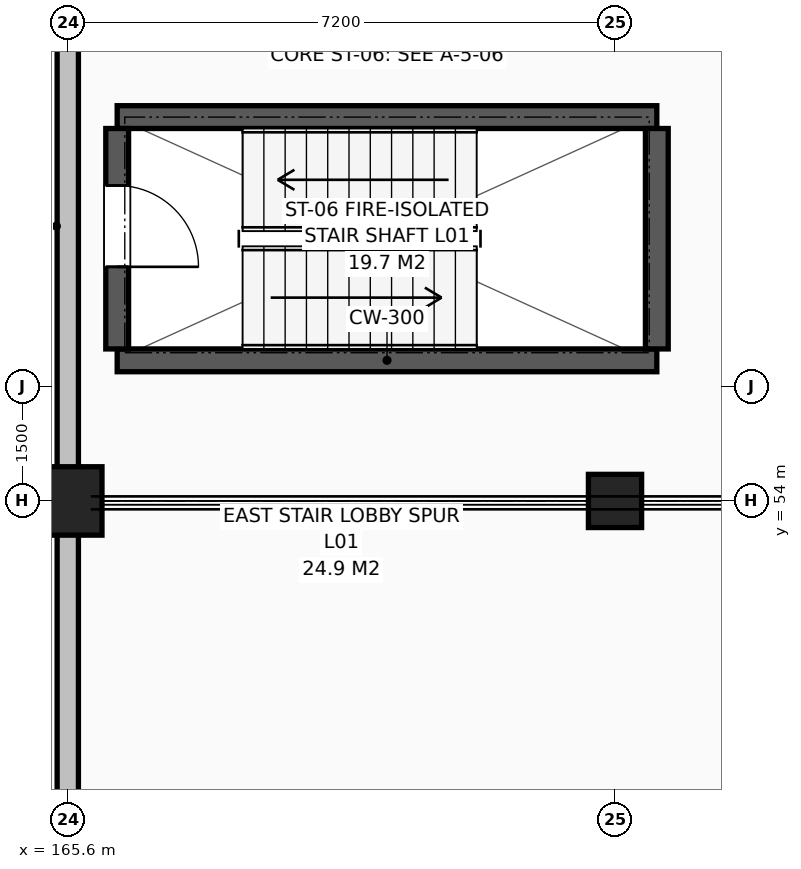
"""IFC4 building model, lengths in metres.
Left out: names, types, materials, properties, quantities, classifications, styles, units other than length and angle.
Written with IfcOpenShell. Run it as: python <this file> out.ifc"""

import sys

from ifc_helpers import new_model, si_unit, direction, frame, frame_2d, origin, origin_2d, place, context, subcontext, project, spatial, rectangle, extrude, element, fill, save


model = new_model("IFC4")
c1 = context("Model", 3, precision=1e-05, world=origin(), true_north=direction((0.0, 1.0)))
c2 = subcontext(c1, "Body", "Model", "MODEL_VIEW")
j1 = project(units=[si_unit("LENGTHUNIT", "METRE"), si_unit("PLANEANGLEUNIT", "RADIAN")], contexts=[c1])
p1 = place(None, origin())
s1 = spatial("IfcSite", under=j1, at=p1, CompositionType="ELEMENT")
p2 = place(p1, origin())
s2 = spatial("IfcBuilding", under=s1, at=p2, CompositionType="ELEMENT")
p3 = place(p2, frame((0.0, 0.0, 4.8)))
s3 = spatial("IfcBuildingStorey", under=s2, at=p3, CompositionType="ELEMENT", Elevation=4.8)
p4 = place(p3, frame((165.6, 54.0, 0.0), z_axis=(0.0, 0.0, 1.0), x_axis=(1.0, 0.0, 0.0)))
e1 = element("IfcColumn", 1, at=p4, inside=s3, PredefinedType="COLUMN", context=c2, shape_type="SweptSolid", body=[
    extrude(rectangle(XDim=0.9, YDim=0.9, at=origin_2d()), origin(), (0.0, 0.0, 1.0), 4.2),
])
p5 = place(p3, frame((172.8, 54.0, 0.0), z_axis=(0.0, 0.0, 1.0), x_axis=(1.0, 0.0, 0.0)))
e2 = element("IfcColumn", 2, at=p5, inside=s3, PredefinedType="COLUMN", context=c2, shape_type="SweptSolid", body=[
    extrude(rectangle(XDim=0.7, YDim=0.7, at=origin_2d()), origin(), (0.0, 0.0, 1.0), 4.2),
])
p6 = place(p3, frame((165.6, 54.0, 0.0), z_axis=(0.0, 0.0, 1.0), x_axis=(-1.0, 0.0, 0.0)))
e3 = element("IfcWall", 3, at=p6, inside=s3, PredefinedType="SOLIDWALL", context=c2, shape_type="SweptSolid", body=[
    extrude(rectangle(XDim=57.6, YDim=0.28, at=frame_2d((28.8, 0.0))), origin(), (0.0, 0.0, 1.0), 3.5),
])
p7 = place(p6, frame((2.2, 0.0, 0.78)))
e4 = element("IfcOpeningElement", 4, at=p7, cuts=e3, PredefinedType="OPENING", context=c2, shape_type="SweptSolid", body=[
    extrude(rectangle(XDim=1.65, YDim=1.8, at=frame_2d((0.825, 0.9))), frame((0.0, 0.15, 0.0), z_axis=(0.0, -1.0, 0.0), x_axis=(1.0, 0.0, 0.0)), (0.0, 0.0, 1.0), 0.3),
])
p8 = place(p6, frame((9.4, 0.0, 0.78)))
e5 = element("IfcOpeningElement", 5, at=p8, cuts=e3, PredefinedType="OPENING", context=c2, shape_type="SweptSolid", body=[
    extrude(rectangle(XDim=1.95, YDim=1.8, at=frame_2d((0.975, 0.9))), frame((0.0, 0.15, 0.0), z_axis=(0.0, -1.0, 0.0), x_axis=(1.0, 0.0, 0.0)), (0.0, 0.0, 1.0), 0.3),
])
p9 = place(p6, frame((16.6, 0.0, 0.78)))
e6 = element("IfcOpeningElement", 6, at=p9, cuts=e3, PredefinedType="OPENING", context=c2, shape_type="SweptSolid", body=[
    extrude(rectangle(XDim=2.1, YDim=1.8, at=frame_2d((1.05, 0.9))), frame((0.0, 0.15, 0.0), z_axis=(0.0, -1.0, 0.0), x_axis=(1.0, 0.0, 0.0)), (0.0, 0.0, 1.0), 0.3),
])
p10 = place(p6, frame((23.8, 0.0, 0.78)))
e7 = element("IfcOpeningElement", 7, at=p10, cuts=e3, PredefinedType="OPENING", context=c2, shape_type="SweptSolid", body=[
    extrude(rectangle(XDim=1.1, YDim=1.65, at=frame_2d((0.55, 0.825))), frame((0.0, 0.15, 0.0), z_axis=(0.0, -1.0, 0.0), x_axis=(1.0, 0.0, 0.0)), (0.0, 0.0, 1.0), 0.3),
])
p11 = place(p6, frame((31.0, 0.0, 0.78)))
e8 = element("IfcOpeningElement", 8, at=p11, cuts=e3, PredefinedType="OPENING", context=c2, shape_type="SweptSolid", body=[
    extrude(rectangle(XDim=1.25, YDim=1.7, at=frame_2d((0.625, 0.85))), frame((0.0, 0.15, 0.0), z_axis=(0.0, -1.0, 0.0), x_axis=(1.0, 0.0, 0.0)), (0.0, 0.0, 1.0), 0.3),
])
p12 = place(p6, frame((38.2, 0.0, 0.78)))
e9 = element("IfcOpeningElement", 9, at=p12, cuts=e3, PredefinedType="OPENING", context=c2, shape_type="SweptSolid", body=[
    extrude(rectangle(XDim=1.35, YDim=1.75, at=frame_2d((0.675, 0.875))), frame((0.0, 0.15, 0.0), z_axis=(0.0, -1.0, 0.0), x_axis=(1.0, 0.0, 0.0)), (0.0, 0.0, 1.0), 0.3),
])
p13 = place(p6, frame((45.4, 0.0, 0.78)))
e10 = element("IfcOpeningElement", 10, at=p13, cuts=e3, PredefinedType="OPENING", context=c2, shape_type="SweptSolid", body=[
    extrude(rectangle(XDim=1.5, YDim=1.75, at=frame_2d((0.75, 0.875))), frame((0.0, 0.15, 0.0), z_axis=(0.0, -1.0, 0.0), x_axis=(1.0, 0.0, 0.0)), (0.0, 0.0, 1.0), 0.3),
])
p14 = place(p3, frame((165.6, 86.4, 0.0), z_axis=(0.0, 0.0, 1.0), x_axis=(0.0, -1.0, 0.0)))
e11 = element("IfcWall", 11, at=p14, inside=s3, PredefinedType="SOLIDWALL", context=c2, shape_type="SweptSolid", body=[
    extrude(rectangle(XDim=43.2, YDim=0.28, at=frame_2d((21.6, 0.0))), origin(), (0.0, 0.0, 1.0), 3.5),
])
p15 = place(p14, frame((9.4, 0.0, 0.78)))
e12 = element("IfcOpeningElement", 12, at=p15, cuts=e11, PredefinedType="OPENING", context=c2, shape_type="SweptSolid", body=[
    extrude(rectangle(XDim=1.25, YDim=1.7, at=frame_2d((0.625, 0.85))), frame((0.0, 0.15, 0.0), z_axis=(0.0, -1.0, 0.0), x_axis=(1.0, 0.0, 0.0)), (0.0, 0.0, 1.0), 0.3),
])
p16 = place(p14, frame((16.6, 0.0, 0.78)))
e13 = element("IfcOpeningElement", 13, at=p16, cuts=e11, PredefinedType="OPENING", context=c2, shape_type="SweptSolid", body=[
    extrude(rectangle(XDim=1.35, YDim=1.75, at=frame_2d((0.675, 0.875))), frame((0.0, 0.15, 0.0), z_axis=(0.0, -1.0, 0.0), x_axis=(1.0, 0.0, 0.0)), (0.0, 0.0, 1.0), 0.3),
])
p17 = place(p14, frame((23.8, 0.0, 0.78)))
e14 = element("IfcOpeningElement", 14, at=p17, cuts=e11, PredefinedType="OPENING", context=c2, shape_type="SweptSolid", body=[
    extrude(rectangle(XDim=1.5, YDim=1.75, at=frame_2d((0.75, 0.875))), frame((0.0, 0.15, 0.0), z_axis=(0.0, -1.0, 0.0), x_axis=(1.0, 0.0, 0.0)), (0.0, 0.0, 1.0), 0.3),
])
for number, where, z_axis, x_axis in (
    (15, (166.25, 55.85, 0.0), (0.0, 0.0, 1.0), (1.0, 0.0, 0.0)),
    (16, (173.35, 59.05, 0.0), (0.0, 0.0, 1.0), (-1.0, 0.0, 0.0)),
):
    element("IfcWall", number, at=place(p3, frame(where, z_axis=z_axis, x_axis=x_axis)), inside=s3, PredefinedType="SHEAR", context=c2, shape_type="SweptSolid", body=[
        extrude(rectangle(XDim=7.1, YDim=0.3, at=frame_2d((3.55, 0.0))), origin(), (0.0, 0.0, 1.0), 3.925),
    ])
p18 = place(p3, frame((173.35, 56.0, 0.0), z_axis=(0.0, 0.0, 1.0), x_axis=(0.0, 1.0, 0.0)))
e17 = element("IfcWall", 17, at=p18, inside=s3, PredefinedType="SHEAR", context=c2, shape_type="SweptSolid", body=[
    extrude(rectangle(XDim=2.9, YDim=0.3, at=frame_2d((1.45, 0.0))), origin(), (0.0, 0.0, 1.0), 3.925),
])
p19 = place(p3, frame((166.25, 58.9, 0.0), z_axis=(0.0, 0.0, 1.0), x_axis=(0.0, -1.0, 0.0)))
e18 = element("IfcWall", 18, at=p19, inside=s3, PredefinedType="SHEAR", context=c2, shape_type="SweptSolid", body=[
    extrude(rectangle(XDim=2.9, YDim=0.3, at=frame_2d((1.45, 0.0))), origin(), (0.0, 0.0, 1.0), 3.925),
])
p20 = place(p19, frame((0.75, 0.0, 0.0)))
e19 = element("IfcOpeningElement", 19, at=p20, cuts=e18, PredefinedType="OPENING", context=c2, shape_type="SweptSolid", body=[
    extrude(rectangle(XDim=1.07, YDim=2.15, at=frame_2d((0.535, 1.075))), frame((0.0, 0.16, 0.0), z_axis=(0.0, -1.0, 0.0), x_axis=(1.0, 0.0, 0.0)), (0.0, 0.0, 1.0), 0.32),
])
p21 = place(p20, origin())
e20 = element("IfcDoor", 20, at=p21, inside=s3, OperationType="SINGLE_SWING_RIGHT", PredefinedType="DOOR", context=c2, shape_type="SweptSolid", body=[
    extrude(rectangle(XDim=1.07, YDim=2.15, at=frame_2d((0.535, 1.075))), frame((0.0, 0.025, 0.0), z_axis=(0.0, -1.0, 0.0), x_axis=(1.0, 0.0, 0.0)), (0.0, 0.0, 1.0), 0.05),
])
fill(e19, e20)
save(model, sys.argv[1])
